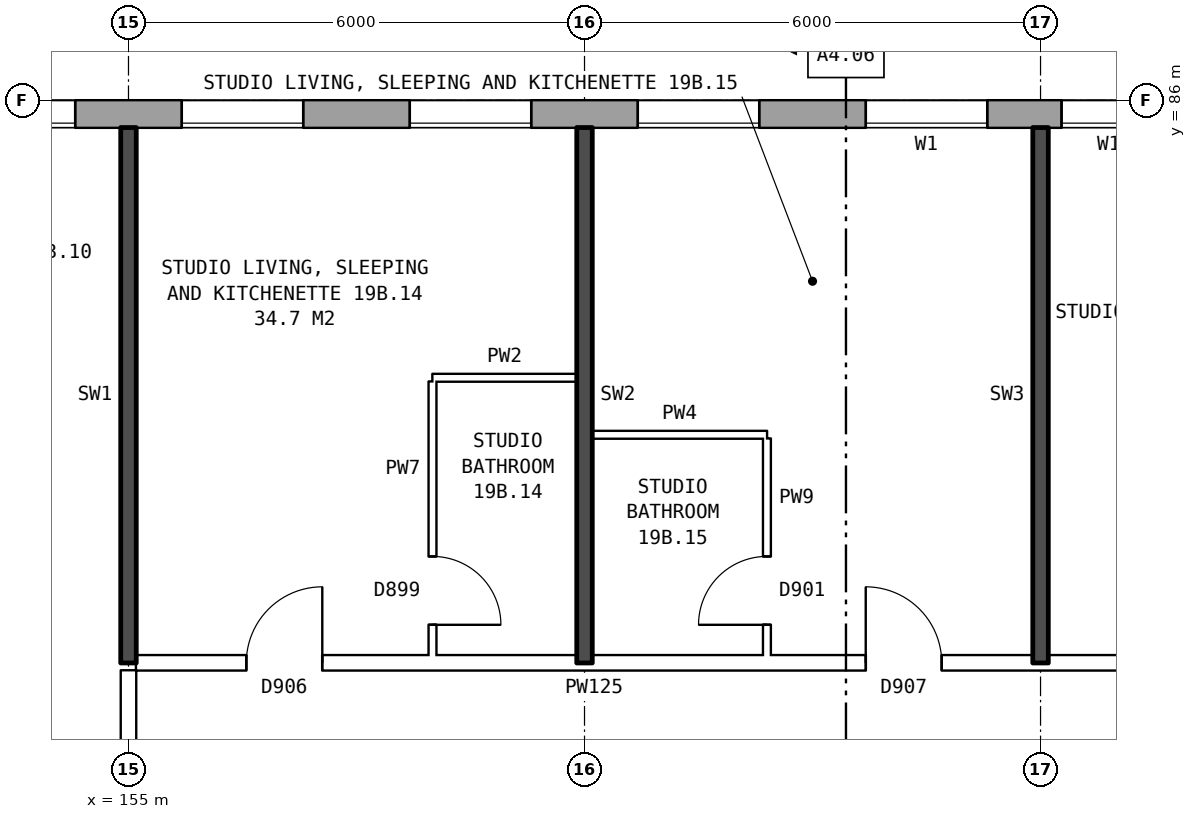
"""IFC4 building model, lengths in metres.
Left out: names, types, materials, properties, quantities, classifications, styles, units other than length and angle.
Written with IfcOpenShell. Run it as: python <this file> out.ifc"""

import sys

from ifc_helpers import new_model, si_unit, direction, frame, frame_2d, origin, place, context, subcontext, project, spatial, rectangle, extrude, element, fill, save


model = new_model("IFC4")
c1 = context("Model", 3, precision=1e-05, world=origin(), true_north=direction((0.0, 1.0)))
c2 = subcontext(c1, "Body", "Model", "MODEL_VIEW")
j1 = project(units=[si_unit("LENGTHUNIT", "METRE"), si_unit("PLANEANGLEUNIT", "RADIAN")], contexts=[c1])
p1 = place(None, origin())
s1 = spatial("IfcSite", under=j1, at=p1, CompositionType="ELEMENT")
p2 = place(p1, origin())
s2 = spatial("IfcBuilding", under=s1, at=p2, CompositionType="ELEMENT")
p3 = place(p2, frame((0.0, 0.0, 71.6)))
s3 = spatial("IfcBuildingStorey", under=s2, at=p3, CompositionType="ELEMENT", Elevation=71.6)
p4 = place(p3, frame((172.175, 85.82, 0.0), z_axis=(0.0, 0.0, 1.0), x_axis=(-1.0, 0.0, 0.0)))
e1 = element("IfcWall", 1, at=p4, inside=s3, PredefinedType="STANDARD", context=c2, shape_type="SweptSolid", body=[
    extrude(rectangle(XDim=38.101, YDim=0.36, at=frame_2d((19.05, 0.0))), origin(), (0.0, 0.0, 1.0), 2.85),
])
p5 = place(p4, frame((0.3, 0.0, 0.8)))
e2 = element("IfcOpeningElement", 2, at=p5, cuts=e1, PredefinedType="OPENING", context=c2, shape_type="SweptSolid", body=[
    extrude(rectangle(XDim=1.0, YDim=1.8, at=frame_2d((0.5, 0.9))), frame((0.0, 0.19, 0.0), z_axis=(0.0, -1.0, 0.0), x_axis=(1.0, 0.0, 0.0)), (0.0, 0.0, 1.0), 0.38),
])
p6 = place(p4, frame((5.875, 0.0, 0.8)))
e3 = element("IfcOpeningElement", 3, at=p6, cuts=e1, PredefinedType="OPENING", context=c2, shape_type="SweptSolid", body=[
    extrude(rectangle(XDim=1.6, YDim=1.8, at=frame_2d((0.8, 0.9))), frame((0.0, 0.19, 0.0), z_axis=(0.0, -1.0, 0.0), x_axis=(1.0, 0.0, 0.0)), (0.0, 0.0, 1.0), 0.38),
])
p7 = place(p4, frame((8.875, 0.0, 0.8)))
e4 = element("IfcOpeningElement", 4, at=p7, cuts=e1, PredefinedType="OPENING", context=c2, shape_type="SweptSolid", body=[
    extrude(rectangle(XDim=1.6, YDim=1.8, at=frame_2d((0.8, 0.9))), frame((0.0, 0.19, 0.0), z_axis=(0.0, -1.0, 0.0), x_axis=(1.0, 0.0, 0.0)), (0.0, 0.0, 1.0), 0.38),
])
p8 = place(p4, frame((11.875, 0.0, 0.8)))
e5 = element("IfcOpeningElement", 5, at=p8, cuts=e1, PredefinedType="OPENING", context=c2, shape_type="SweptSolid", body=[
    extrude(rectangle(XDim=1.6, YDim=1.8, at=frame_2d((0.8, 0.9))), frame((0.0, 0.19, 0.0), z_axis=(0.0, -1.0, 0.0), x_axis=(1.0, 0.0, 0.0)), (0.0, 0.0, 1.0), 0.38),
])
p9 = place(p4, frame((14.875, 0.0, 0.8)))
e6 = element("IfcOpeningElement", 6, at=p9, cuts=e1, PredefinedType="OPENING", context=c2, shape_type="SweptSolid", body=[
    extrude(rectangle(XDim=1.6, YDim=1.8, at=frame_2d((0.8, 0.9))), frame((0.0, 0.19, 0.0), z_axis=(0.0, -1.0, 0.0), x_axis=(1.0, 0.0, 0.0)), (0.0, 0.0, 1.0), 0.38),
])
p10 = place(p4, frame((17.875, 0.0, 0.8)))
e7 = element("IfcOpeningElement", 7, at=p10, cuts=e1, PredefinedType="OPENING", context=c2, shape_type="SweptSolid", body=[
    extrude(rectangle(XDim=1.6, YDim=1.8, at=frame_2d((0.8, 0.9))), frame((0.0, 0.19, 0.0), z_axis=(0.0, -1.0, 0.0), x_axis=(1.0, 0.0, 0.0)), (0.0, 0.0, 1.0), 0.38),
])
p11 = place(p4, frame((20.875, 0.0, 0.8)))
e8 = element("IfcOpeningElement", 8, at=p11, cuts=e1, PredefinedType="OPENING", context=c2, shape_type="SweptSolid", body=[
    extrude(rectangle(XDim=1.6, YDim=1.8, at=frame_2d((0.8, 0.9))), frame((0.0, 0.19, 0.0), z_axis=(0.0, -1.0, 0.0), x_axis=(1.0, 0.0, 0.0)), (0.0, 0.0, 1.0), 0.38),
])
p12 = place(p4, frame((23.875, 0.0, 0.8)))
e9 = element("IfcOpeningElement", 9, at=p12, cuts=e1, PredefinedType="OPENING", context=c2, shape_type="SweptSolid", body=[
    extrude(rectangle(XDim=1.6, YDim=1.8, at=frame_2d((0.8, 0.9))), frame((0.0, 0.19, 0.0), z_axis=(0.0, -1.0, 0.0), x_axis=(1.0, 0.0, 0.0)), (0.0, 0.0, 1.0), 0.38),
])
p13 = place(p4, frame((26.875, 0.0, 0.8)))
e10 = element("IfcOpeningElement", 10, at=p13, cuts=e1, PredefinedType="OPENING", context=c2, shape_type="SweptSolid", body=[
    extrude(rectangle(XDim=1.6, YDim=1.8, at=frame_2d((0.8, 0.9))), frame((0.0, 0.19, 0.0), z_axis=(0.0, -1.0, 0.0), x_axis=(1.0, 0.0, 0.0)), (0.0, 0.0, 1.0), 0.38),
])
p14 = place(p4, frame((29.875, 0.0, 0.8)))
e11 = element("IfcOpeningElement", 11, at=p14, cuts=e1, PredefinedType="OPENING", context=c2, shape_type="SweptSolid", body=[
    extrude(rectangle(XDim=1.6, YDim=1.8, at=frame_2d((0.8, 0.9))), frame((0.0, 0.19, 0.0), z_axis=(0.0, -1.0, 0.0), x_axis=(1.0, 0.0, 0.0)), (0.0, 0.0, 1.0), 0.38),
])
p15 = place(p4, frame((31.775, 0.0, 0.8)))
e12 = element("IfcOpeningElement", 12, at=p15, cuts=e1, PredefinedType="OPENING", context=c2, shape_type="SweptSolid", body=[
    extrude(rectangle(XDim=1.6, YDim=1.8, at=frame_2d((0.8, 0.9))), frame((0.0, 0.19, 0.0), z_axis=(0.0, -1.0, 0.0), x_axis=(1.0, 0.0, 0.0)), (0.0, 0.0, 1.0), 0.38),
])
p16 = place(p4, frame((35.775, 0.0, 1.7)))
e13 = element("IfcOpeningElement", 13, at=p16, cuts=e1, PredefinedType="OPENING", context=c2, shape_type="SweptSolid", body=[
    extrude(rectangle(XDim=0.6, YDim=0.9, at=frame_2d((0.3, 0.45))), frame((0.0, 0.19, 0.0), z_axis=(0.0, -1.0, 0.0), x_axis=(1.0, 0.0, 0.0)), (0.0, 0.0, 1.0), 0.38),
])
p17 = place(p4, frame((1.6, 0.0, 1.6)))
e14 = element("IfcOpeningElement", 14, at=p17, cuts=e1, PredefinedType="OPENING", context=c2, shape_type="SweptSolid", body=[
    extrude(rectangle(XDim=0.6, YDim=0.9, at=frame_2d((0.3, 0.45))), frame((0.0, 0.19, 0.0), z_axis=(0.0, -1.0, 0.0), x_axis=(1.0, 0.0, 0.0)), (0.0, 0.0, 1.0), 0.38),
])
p18 = place(p4, frame((3.5, 0.0, 0.8)))
e15 = element("IfcOpeningElement", 15, at=p18, cuts=e1, PredefinedType="OPENING", context=c2, shape_type="SweptSolid", body=[
    extrude(rectangle(XDim=1.4, YDim=0.9, at=frame_2d((0.7, 0.45))), frame((0.0, 0.19, 0.0), z_axis=(0.0, -1.0, 0.0), x_axis=(1.0, 0.0, 0.0)), (0.0, 0.0, 1.0), 0.38),
])
p19 = place(p4, frame((33.675, 0.0, 0.8)))
e16 = element("IfcOpeningElement", 16, at=p19, cuts=e1, PredefinedType="OPENING", context=c2, shape_type="SweptSolid", body=[
    extrude(rectangle(XDim=0.6, YDim=1.2, at=frame_2d((0.3, 0.6))), frame((0.0, 0.19, 0.0), z_axis=(0.0, -1.0, 0.0), x_axis=(1.0, 0.0, 0.0)), (0.0, 0.0, 1.0), 0.38),
])
p20 = place(p4, frame((36.675, 0.0, 0.8)))
e17 = element("IfcOpeningElement", 17, at=p20, cuts=e1, PredefinedType="OPENING", context=c2, shape_type="SweptSolid", body=[
    extrude(rectangle(XDim=1.0, YDim=1.8, at=frame_2d((0.5, 0.9))), frame((0.0, 0.19, 0.0), z_axis=(0.0, -1.0, 0.0), x_axis=(1.0, 0.0, 0.0)), (0.0, 0.0, 1.0), 0.38),
])
p21 = place(p3, frame((155.1, 78.6, 0.0), z_axis=(0.0, 0.0, 1.0), x_axis=(1.0, 0.0, 0.0)))
e18 = element("IfcWall", 18, at=p21, inside=s3, PredefinedType="PARTITIONING", context=c2, shape_type="SweptSolid", body=[
    extrude(rectangle(XDim=19.79, YDim=0.2, at=frame_2d((9.895, 0.0))), origin(), (0.0, 0.0, 1.0), 2.85),
])
p22 = place(p21, frame((1.45, 0.0, 0.0)))
e19 = element("IfcOpeningElement", 19, at=p22, cuts=e18, PredefinedType="OPENING", context=c2, shape_type="SweptSolid", body=[
    extrude(rectangle(XDim=1.0, YDim=2.1, at=frame_2d((0.5, 1.05))), frame((0.0, 0.11, 0.0), z_axis=(0.0, -1.0, 0.0), x_axis=(1.0, 0.0, 0.0)), (0.0, 0.0, 1.0), 0.22),
])
p23 = place(p21, frame((9.6, 0.0, 0.0)))
e20 = element("IfcOpeningElement", 20, at=p23, cuts=e18, PredefinedType="OPENING", context=c2, shape_type="SweptSolid", body=[
    extrude(rectangle(XDim=1.0, YDim=2.1, at=frame_2d((0.5, 1.05))), frame((0.0, 0.11, 0.0), z_axis=(0.0, -1.0, 0.0), x_axis=(1.0, 0.0, 0.0)), (0.0, 0.0, 1.0), 0.22),
])
p24 = place(p21, frame((13.2, 0.0, 0.0)))
e21 = element("IfcOpeningElement", 21, at=p24, cuts=e18, PredefinedType="OPENING", context=c2, shape_type="SweptSolid", body=[
    extrude(rectangle(XDim=1.0, YDim=2.1, at=frame_2d((0.5, 1.05))), frame((0.0, 0.11, 0.0), z_axis=(0.0, -1.0, 0.0), x_axis=(1.0, 0.0, 0.0)), (0.0, 0.0, 1.0), 0.22),
])
p25 = place(p3, frame((161.1, 81.6, 0.0), z_axis=(0.0, 0.0, 1.0), x_axis=(1.0, 0.0, 0.0)))
e22 = element("IfcWall", 22, at=p25, inside=s3, PredefinedType="PARTITIONING", context=c2, shape_type="SweptSolid", body=[
    extrude(rectangle(XDim=2.3, YDim=0.1, at=frame_2d((1.15, 0.0))), origin(), (0.0, 0.0, 1.0), 2.85),
])
p26 = place(p3, frame((159.0, 82.35, 0.0), z_axis=(0.0, 0.0, 1.0), x_axis=(1.0, 0.0, 0.0)))
e23 = element("IfcWall", 23, at=p26, inside=s3, PredefinedType="PARTITIONING", context=c2, shape_type="SweptSolid", body=[
    extrude(rectangle(XDim=1.9, YDim=0.1, at=frame_2d((0.95, 0.0))), origin(), (0.0, 0.0, 1.0), 2.85),
])
p27 = place(p3, frame((155.0, 76.3, 0.0), z_axis=(0.0, 0.0, 1.0), x_axis=(0.0, 1.0, 0.0)))
e24 = element("IfcWall", 24, at=p27, inside=s3, PredefinedType="PARTITIONING", context=c2, shape_type="SweptSolid", body=[
    extrude(rectangle(XDim=2.2, YDim=0.2, at=frame_2d((1.1, 0.0))), origin(), (0.0, 0.0, 1.0), 2.85),
])
p28 = place(p3, frame((155.0, 78.6, 0.0), z_axis=(0.0, 0.0, 1.0), x_axis=(0.0, 1.0, 0.0)))
e25 = element("IfcWall", 25, at=p28, inside=s3, PredefinedType="SOLIDWALL", context=c2, shape_type="SweptSolid", body=[
    extrude(rectangle(XDim=7.04, YDim=0.2, at=frame_2d((3.52, 0.0))), origin(), (0.0, 0.0, 1.0), 2.85),
])
p29 = place(p3, frame((159.0, 78.7, 0.0), z_axis=(0.0, 0.0, 1.0), x_axis=(0.0, 1.0, 0.0)))
e26 = element("IfcWall", 26, at=p29, inside=s3, PredefinedType="PARTITIONING", context=c2, shape_type="SweptSolid", body=[
    extrude(rectangle(XDim=3.6, YDim=0.1, at=frame_2d((1.8, 0.0))), origin(), (0.0, 0.0, 1.0), 2.85),
])
p30 = place(p29, frame((0.4, 0.0, 0.0)))
e27 = element("IfcOpeningElement", 27, at=p30, cuts=e26, PredefinedType="OPENING", context=c2, shape_type="SweptSolid", body=[
    extrude(rectangle(XDim=0.9, YDim=2.1, at=frame_2d((0.45, 1.05))), frame((0.0, 0.06, 0.0), z_axis=(0.0, -1.0, 0.0), x_axis=(1.0, 0.0, 0.0)), (0.0, 0.0, 1.0), 0.12),
])
p31 = place(p3, frame((161.0, 78.6, 0.0), z_axis=(0.0, 0.0, 1.0), x_axis=(0.0, 1.0, 0.0)))
e28 = element("IfcWall", 28, at=p31, inside=s3, PredefinedType="SOLIDWALL", context=c2, shape_type="SweptSolid", body=[
    extrude(rectangle(XDim=7.04, YDim=0.2, at=frame_2d((3.52, 0.0))), origin(), (0.0, 0.0, 1.0), 2.85),
])
p32 = place(p3, frame((163.4, 78.7, 0.0), z_axis=(0.0, 0.0, 1.0), x_axis=(0.0, 1.0, 0.0)))
e29 = element("IfcWall", 29, at=p32, inside=s3, PredefinedType="PARTITIONING", context=c2, shape_type="SweptSolid", body=[
    extrude(rectangle(XDim=2.85, YDim=0.1, at=frame_2d((1.425, 0.0))), origin(), (0.0, 0.0, 1.0), 2.85),
])
p33 = place(p32, frame((0.4, 0.0, 0.0)))
e30 = element("IfcOpeningElement", 30, at=p33, cuts=e29, PredefinedType="OPENING", context=c2, shape_type="SweptSolid", body=[
    extrude(rectangle(XDim=0.9, YDim=2.1, at=frame_2d((0.45, 1.05))), frame((0.0, 0.06, 0.0), z_axis=(0.0, -1.0, 0.0), x_axis=(1.0, 0.0, 0.0)), (0.0, 0.0, 1.0), 0.12),
])
p34 = place(p3, frame((167.0, 78.6, 0.0), z_axis=(0.0, 0.0, 1.0), x_axis=(0.0, 1.0, 0.0)))
e31 = element("IfcWall", 31, at=p34, inside=s3, PredefinedType="SOLIDWALL", context=c2, shape_type="SweptSolid", body=[
    extrude(rectangle(XDim=7.04, YDim=0.2, at=frame_2d((3.52, 0.0))), origin(), (0.0, 0.0, 1.0), 2.85),
])
p35 = place(p6, origin())
e32 = element("IfcWindow", 32, at=p35, inside=s3, PartitioningType="SINGLE_PANEL", PredefinedType="WINDOW", context=c2, shape_type="SweptSolid", body=[
    extrude(rectangle(XDim=1.6, YDim=1.8, at=frame_2d((0.8, 0.9))), frame((0.0, 0.15, 0.0), z_axis=(0.0, -1.0, 0.0), x_axis=(1.0, 0.0, 0.0)), (0.0, 0.0, 1.0), 0.06),
])
fill(e3, e32)
p36 = place(p7, origin())
e33 = element("IfcWindow", 33, at=p36, inside=s3, PartitioningType="SINGLE_PANEL", PredefinedType="WINDOW", context=c2, shape_type="SweptSolid", body=[
    extrude(rectangle(XDim=1.6, YDim=1.8, at=frame_2d((0.8, 0.9))), frame((0.0, 0.15, 0.0), z_axis=(0.0, -1.0, 0.0), x_axis=(1.0, 0.0, 0.0)), (0.0, 0.0, 1.0), 0.06),
])
fill(e4, e33)
p37 = place(p8, origin())
e34 = element("IfcWindow", 34, at=p37, inside=s3, PartitioningType="SINGLE_PANEL", PredefinedType="WINDOW", context=c2, shape_type="SweptSolid", body=[
    extrude(rectangle(XDim=1.6, YDim=1.8, at=frame_2d((0.8, 0.9))), frame((0.0, 0.15, 0.0), z_axis=(0.0, -1.0, 0.0), x_axis=(1.0, 0.0, 0.0)), (0.0, 0.0, 1.0), 0.06),
])
fill(e5, e34)
p38 = place(p9, origin())
e35 = element("IfcWindow", 35, at=p38, inside=s3, PartitioningType="SINGLE_PANEL", PredefinedType="WINDOW", context=c2, shape_type="SweptSolid", body=[
    extrude(rectangle(XDim=1.6, YDim=1.8, at=frame_2d((0.8, 0.9))), frame((0.0, 0.15, 0.0), z_axis=(0.0, -1.0, 0.0), x_axis=(1.0, 0.0, 0.0)), (0.0, 0.0, 1.0), 0.06),
])
fill(e6, e35)
p39 = place(p10, origin())
e36 = element("IfcWindow", 36, at=p39, inside=s3, PartitioningType="SINGLE_PANEL", PredefinedType="WINDOW", context=c2, shape_type="SweptSolid", body=[
    extrude(rectangle(XDim=1.6, YDim=1.8, at=frame_2d((0.8, 0.9))), frame((0.0, 0.15, 0.0), z_axis=(0.0, -1.0, 0.0), x_axis=(1.0, 0.0, 0.0)), (0.0, 0.0, 1.0), 0.06),
])
fill(e7, e36)
p40 = place(p22, origin())
e37 = element("IfcDoor", 37, at=p40, inside=s3, OperationType="SINGLE_SWING_RIGHT", PredefinedType="DOOR", context=c2, shape_type="SweptSolid", body=[
    extrude(rectangle(XDim=1.0, YDim=2.1, at=frame_2d((0.5, 1.05))), frame((0.0, 0.025, 0.0), z_axis=(0.0, -1.0, 0.0), x_axis=(1.0, 0.0, 0.0)), (0.0, 0.0, 1.0), 0.05),
])
fill(e19, e37)
p41 = place(p30, frame((0.9, 0.0, 0.0), z_axis=(0.0, 0.0, 1.0), x_axis=(-1.0, 0.0, 0.0)))
e38 = element("IfcDoor", 38, at=p41, inside=s3, OperationType="SINGLE_SWING_RIGHT", PredefinedType="DOOR", context=c2, shape_type="SweptSolid", body=[
    extrude(rectangle(XDim=0.9, YDim=2.1, at=frame_2d((0.45, 1.05))), frame((0.0, 0.025, 0.0), z_axis=(0.0, -1.0, 0.0), x_axis=(1.0, 0.0, 0.0)), (0.0, 0.0, 1.0), 0.05),
])
fill(e27, e38)
p42 = place(p23, origin())
e39 = element("IfcDoor", 39, at=p42, inside=s3, OperationType="SINGLE_SWING_LEFT", PredefinedType="DOOR", context=c2, shape_type="SweptSolid", body=[
    extrude(rectangle(XDim=1.0, YDim=2.1, at=frame_2d((0.5, 1.05))), frame((0.0, 0.025, 0.0), z_axis=(0.0, -1.0, 0.0), x_axis=(1.0, 0.0, 0.0)), (0.0, 0.0, 1.0), 0.05),
])
fill(e20, e39)
p43 = place(p33, origin())
e40 = element("IfcDoor", 40, at=p43, inside=s3, OperationType="SINGLE_SWING_LEFT", PredefinedType="DOOR", context=c2, shape_type="SweptSolid", body=[
    extrude(rectangle(XDim=0.9, YDim=2.1, at=frame_2d((0.45, 1.05))), frame((0.0, 0.025, 0.0), z_axis=(0.0, -1.0, 0.0), x_axis=(1.0, 0.0, 0.0)), (0.0, 0.0, 1.0), 0.05),
])
fill(e30, e40)
p44 = place(p18, origin())
e41 = element("IfcWindow", 41, at=p44, inside=s3, PartitioningType="SINGLE_PANEL", PredefinedType="WINDOW", context=c2, shape_type="SweptSolid", body=[
    extrude(rectangle(XDim=1.4, YDim=0.9, at=frame_2d((0.7, 0.45))), frame((0.0, 0.15, 0.0), z_axis=(0.0, -1.0, 0.0), x_axis=(1.0, 0.0, 0.0)), (0.0, 0.0, 1.0), 0.06),
])
fill(e15, e41)
save(model, sys.argv[1])
